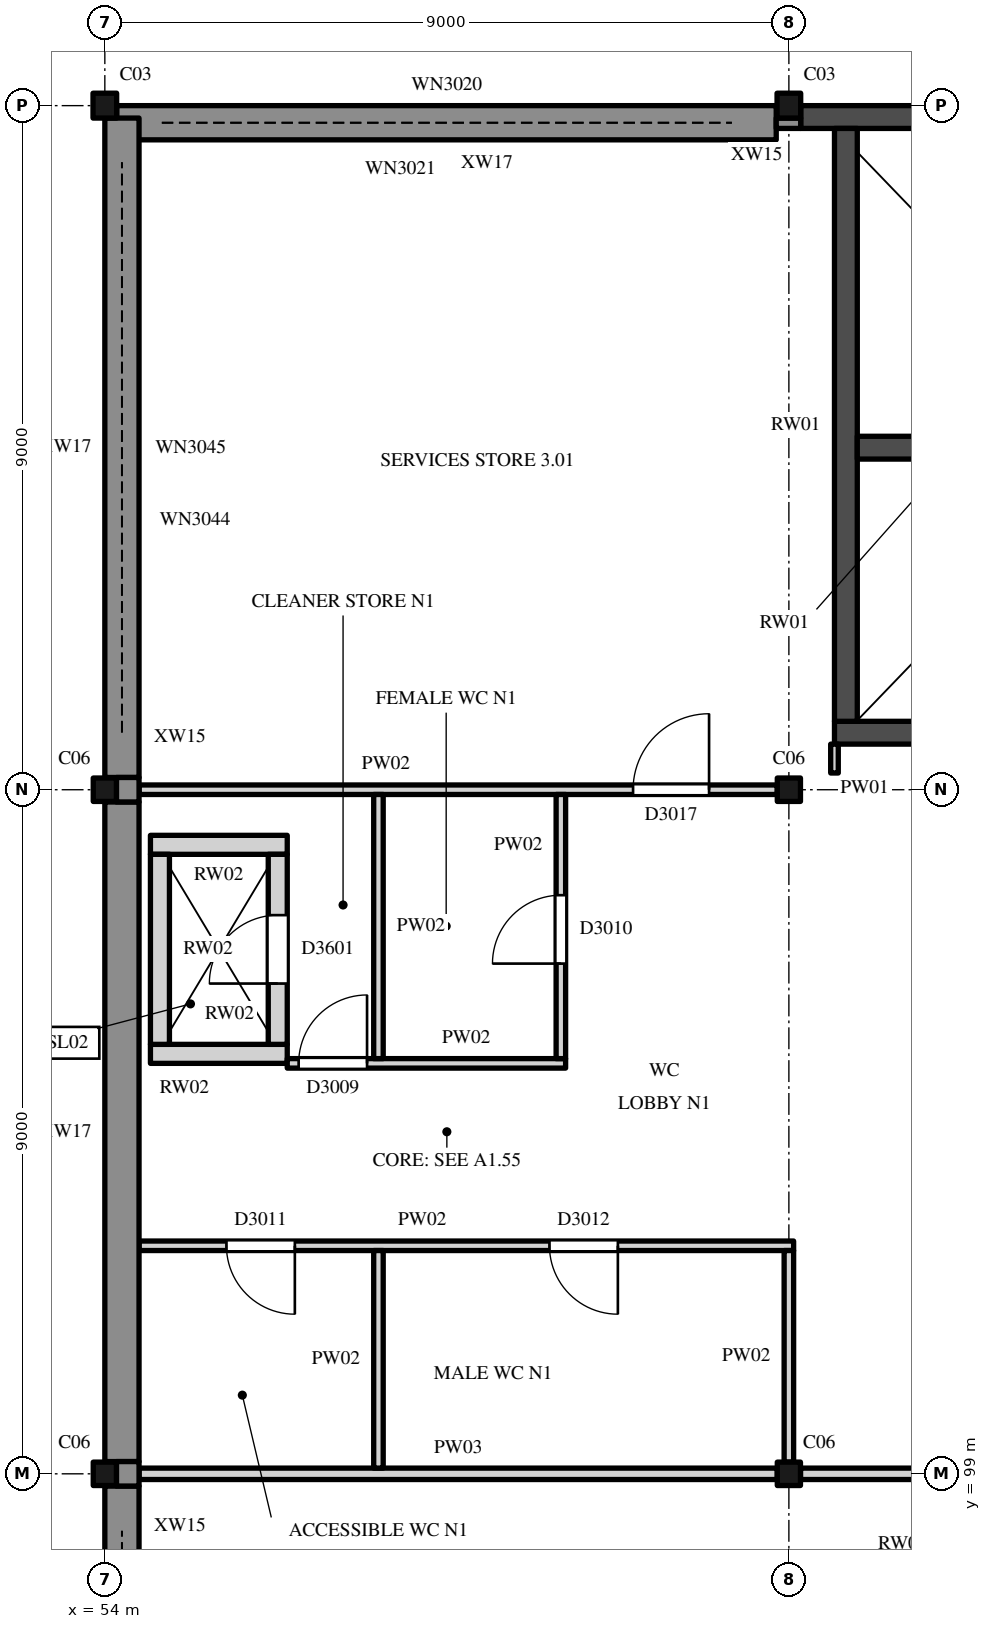
"""IFC4 building model, lengths in metres.
Left out: names, types, materials, properties, quantities, classifications, styles, units other than length and angle.
Written with IfcOpenShell. Run it as: python <this file> out.ifc"""

import sys

from ifc_helpers import new_model, si_unit, direction, frame, frame_2d, origin, origin_2d, place, context, subcontext, project, spatial, rectangle, i_section, extrude, element, fill, save


model = new_model("IFC4")
c1 = context("Model", 3, precision=1e-05, world=origin(), true_north=direction((0.0, 1.0)))
c2 = subcontext(c1, "Body", "Model", "MODEL_VIEW")
j1 = project(units=[si_unit("LENGTHUNIT", "METRE"), si_unit("PLANEANGLEUNIT", "RADIAN")], contexts=[c1])
p1 = place(None, origin())
s1 = spatial("IfcSite", under=j1, at=p1, CompositionType="ELEMENT")
p2 = place(p1, origin())
s2 = spatial("IfcBuilding", under=s1, at=p2, CompositionType="ELEMENT")
p3 = place(p2, frame((0.0, 0.0, 16.0)))
s3 = spatial("IfcBuildingStorey", under=s2, at=p3, CompositionType="ELEMENT", Elevation=16.0)
for number, where, z_axis, x_axis in (
    (1, (54.0, 99.0, 0.0), (0.0, 0.0, 1.0), (1.0, 0.0, 0.0)),
    (2, (63.0, 99.0, 0.0), (0.0, 0.0, 1.0), (1.0, 0.0, 0.0)),
    (3, (54.0, 108.0, 0.0), (0.0, 0.0, 1.0), (1.0, 0.0, 0.0)),
    (4, (63.0, 108.0, 0.0), (0.0, 0.0, 1.0), (1.0, 0.0, 0.0)),
):
    element("IfcColumn", number, at=place(p3, frame(where, z_axis=z_axis, x_axis=x_axis)), inside=s3, PredefinedType="COLUMN", context=c2, shape_type="SweptSolid", body=[
        extrude(i_section(OverallWidth=0.305, OverallDepth=0.308, WebThickness=0.01, FlangeThickness=0.015, FilletRadius=0.017, at=origin_2d()), origin(), (0.0, 0.0, 1.0), 10.0),
    ])
for number, where, z_axis, x_axis in (
    (5, (54.0, 117.0, 0.0), (0.0, 0.0, 1.0), (1.0, 0.0, 0.0)),
    (6, (63.0, 117.0, 0.0), (0.0, 0.0, 1.0), (1.0, 0.0, 0.0)),
):
    element("IfcColumn", number, at=place(p3, frame(where, z_axis=z_axis, x_axis=x_axis)), inside=s3, PredefinedType="COLUMN", context=c2, shape_type="SweptSolid", body=[
        extrude(i_section(OverallWidth=0.311, OverallDepth=0.327, WebThickness=0.016, FlangeThickness=0.025, FilletRadius=0.017, at=origin_2d()), origin(), (0.0, 0.0, 1.0), 10.0),
    ])
p4 = place(p3, frame((63.6, 108.75, 0.0), z_axis=(0.0, 0.0, 1.0), x_axis=(1.0, 0.0, 0.0)))
e7 = element("IfcWall", 7, at=p4, inside=s3, PredefinedType="SHEAR", context=c2, shape_type="SweptSolid", body=[
    extrude(rectangle(XDim=7.8, YDim=0.3, at=frame_2d((3.9, 0.0))), origin(), (0.0, 0.0, 1.0), 10.0),
])
p5 = place(p3, frame((63.156, 116.85, 0.0), z_axis=(0.0, 0.0, 1.0), x_axis=(1.0, 0.0, 0.0)))
e8 = element("IfcWall", 8, at=p5, inside=s3, PredefinedType="SHEAR", context=c2, shape_type="SweptSolid", body=[
    extrude(rectangle(XDim=8.689, YDim=0.3, at=frame_2d((4.344, 0.0))), origin(), (0.0, 0.0, 1.0), 10.0),
])
p6 = place(p3, frame((63.75, 108.9, 0.0), z_axis=(0.0, 0.0, 1.0), x_axis=(0.0, 1.0, 0.0)))
e9 = element("IfcWall", 9, at=p6, inside=s3, PredefinedType="SHEAR", context=c2, shape_type="SweptSolid", body=[
    extrude(rectangle(XDim=7.8, YDim=0.3, at=frame_2d((3.9, 0.0))), origin(), (0.0, 0.0, 1.0), 10.0),
])
p7 = place(p3, frame((66.6, 112.5, 0.0), z_axis=(0.0, 0.0, 1.0), x_axis=(-1.0, 0.0, 0.0)))
e10 = element("IfcWall", 10, at=p7, inside=s3, PredefinedType="SHEAR", context=c2, shape_type="SweptSolid", body=[
    extrude(rectangle(XDim=2.7, YDim=0.3, at=frame_2d((1.35, 0.0))), origin(), (0.0, 0.0, 1.0), 10.0),
])
for number, where, z_axis, x_axis in (
    (11, (54.6, 104.525, 0.0), (0.0, 0.0, 1.0), (1.0, 0.0, 0.0)),
    (12, (54.6, 107.275, 0.0), (0.0, 0.0, 1.0), (1.0, 0.0, 0.0)),
):
    element("IfcWall", number, at=place(p3, frame(where, z_axis=z_axis, x_axis=x_axis)), inside=s3, PredefinedType="STANDARD", context=c2, shape_type="SweptSolid", body=[
        extrude(rectangle(XDim=1.8, YDim=0.25, at=frame_2d((0.9, 0.0))), origin(), (0.0, 0.0, 1.0), 10.0),
    ])
p8 = place(p3, frame((54.725, 104.65, 0.0), z_axis=(0.0, 0.0, 1.0), x_axis=(0.0, 1.0, 0.0)))
e13 = element("IfcWall", 13, at=p8, inside=s3, PredefinedType="STANDARD", context=c2, shape_type="SweptSolid", body=[
    extrude(rectangle(XDim=2.5, YDim=0.25, at=frame_2d((1.25, 0.0))), origin(), (0.0, 0.0, 1.0), 10.0),
])
p9 = place(p3, frame((56.275, 104.65, 0.0), z_axis=(0.0, 0.0, 1.0), x_axis=(0.0, 1.0, 0.0)))
e14 = element("IfcWall", 14, at=p9, inside=s3, PredefinedType="STANDARD", context=c2, shape_type="SweptSolid", body=[
    extrude(rectangle(XDim=2.5, YDim=0.25, at=frame_2d((1.25, 0.0))), origin(), (0.0, 0.0, 1.0), 10.0),
])
p10 = place(p9, frame((0.8, 0.0, 0.0)))
e15 = element("IfcOpeningElement", 15, at=p10, cuts=e14, PredefinedType="OPENING", context=c2, shape_type="SweptSolid", body=[
    extrude(rectangle(XDim=0.9, YDim=2.1, at=frame_2d((0.45, 1.05))), frame((0.0, 0.135, 0.0), z_axis=(0.0, -1.0, 0.0), x_axis=(1.0, 0.0, 0.0)), (0.0, 0.0, 1.0), 0.27),
])
p11 = place(p3, frame((54.225, 90.164, 0.0), z_axis=(0.0, 0.0, 1.0), x_axis=(0.0, 1.0, 0.0)))
e16 = element("IfcWall", 16, at=p11, inside=s3, PredefinedType="SOLIDWALL", context=c2, shape_type="SweptSolid", body=[
    extrude(rectangle(XDim=8.676, YDim=0.45, at=frame_2d((4.338, 0.0))), origin(), (0.0, 0.0, 1.0), 9.371),
])
p12 = place(p11, frame((0.586, 0.0, 6.4)))
e17 = element("IfcOpeningElement", 17, at=p12, cuts=e16, PredefinedType="OPENING", context=c2, shape_type="SweptSolid", body=[
    extrude(rectangle(XDim=7.5, YDim=1.2, at=frame_2d((3.75, 0.6))), frame((0.0, 0.235, 0.0), z_axis=(0.0, -1.0, 0.0), x_axis=(1.0, 0.0, 0.0)), (0.0, 0.0, 1.0), 0.47),
])
p13 = place(p11, frame((0.586, 0.0, 1.6)))
e18 = element("IfcOpeningElement", 18, at=p13, cuts=e16, PredefinedType="OPENING", context=c2, shape_type="SweptSolid", body=[
    extrude(rectangle(XDim=7.5, YDim=1.2, at=frame_2d((3.75, 0.6))), frame((0.0, 0.235, 0.0), z_axis=(0.0, -1.0, 0.0), x_axis=(1.0, 0.0, 0.0)), (0.0, 0.0, 1.0), 0.47),
])
p14 = place(p3, frame((54.225, 99.161, 0.0), z_axis=(0.0, 0.0, 1.0), x_axis=(0.0, 1.0, 0.0)))
e19 = element("IfcWall", 19, at=p14, inside=s3, PredefinedType="SOLIDWALL", context=c2, shape_type="SweptSolid", body=[
    extrude(rectangle(XDim=8.678, YDim=0.45, at=frame_2d((4.339, 0.0))), origin(), (0.0, 0.0, 1.0), 9.371),
])
p15 = place(p3, frame((54.156, 116.775, 0.0), z_axis=(0.0, 0.0, 1.0), x_axis=(1.0, 0.0, 0.0)))
e20 = element("IfcWall", 20, at=p15, inside=s3, PredefinedType="SOLIDWALL", context=c2, shape_type="SweptSolid", body=[
    extrude(rectangle(XDim=8.678, YDim=0.45, at=frame_2d((4.339, 0.0))), origin(), (0.0, 0.0, 1.0), 9.473),
])
p16 = place(p15, frame((0.594, 0.0, 1.6)))
e21 = element("IfcOpeningElement", 21, at=p16, cuts=e20, PredefinedType="OPENING", context=c2, shape_type="SweptSolid", body=[
    extrude(rectangle(XDim=7.5, YDim=1.2, at=frame_2d((3.75, 0.6))), frame((0.0, 0.235, 0.0), z_axis=(0.0, -1.0, 0.0), x_axis=(1.0, 0.0, 0.0)), (0.0, 0.0, 1.0), 0.47),
])
p17 = place(p15, frame((0.594, 0.0, 6.4)))
e22 = element("IfcOpeningElement", 22, at=p17, cuts=e20, PredefinedType="OPENING", context=c2, shape_type="SweptSolid", body=[
    extrude(rectangle(XDim=7.5, YDim=1.2, at=frame_2d((3.75, 0.6))), frame((0.0, 0.235, 0.0), z_axis=(0.0, -1.0, 0.0), x_axis=(1.0, 0.0, 0.0)), (0.0, 0.0, 1.0), 0.47),
])
p18 = place(p3, frame((54.225, 108.161, 0.0), z_axis=(0.0, 0.0, 1.0), x_axis=(0.0, 1.0, 0.0)))
e23 = element("IfcWall", 23, at=p18, inside=s3, PredefinedType="SOLIDWALL", context=c2, shape_type="SweptSolid", body=[
    extrude(rectangle(XDim=8.676, YDim=0.45, at=frame_2d((4.338, 0.0))), origin(), (0.0, 0.0, 1.0), 9.371),
])
p19 = place(p18, frame((0.589, 0.0, 6.4)))
e24 = element("IfcOpeningElement", 24, at=p19, cuts=e23, PredefinedType="OPENING", context=c2, shape_type="SweptSolid", body=[
    extrude(rectangle(XDim=7.5, YDim=1.2, at=frame_2d((3.75, 0.6))), frame((0.0, 0.235, 0.0), z_axis=(0.0, -1.0, 0.0), x_axis=(1.0, 0.0, 0.0)), (0.0, 0.0, 1.0), 0.47),
])
p20 = place(p18, frame((0.596, 0.0, 1.6)))
e25 = element("IfcOpeningElement", 25, at=p20, cuts=e23, PredefinedType="OPENING", context=c2, shape_type="SweptSolid", body=[
    extrude(rectangle(XDim=7.5, YDim=1.2, at=frame_2d((3.75, 0.6))), frame((0.0, 0.235, 0.0), z_axis=(0.0, -1.0, 0.0), x_axis=(1.0, 0.0, 0.0)), (0.0, 0.0, 1.0), 0.47),
])
p21 = place(p3, frame((62.833, 116.768, 0.0), z_axis=(0.0, 0.0, 1.0), x_axis=(1.0, 0.0, 0.0)))
e26 = element("IfcWall", 26, at=p21, inside=s3, PredefinedType="SOLIDWALL", context=c2, shape_type="SweptSolid", body=[
    extrude(rectangle(XDim=0.322, YDim=0.136, at=frame_2d((0.161, 0.0))), origin(), (0.0, 0.0, 1.0), 10.0),
])
for number, where, z_axis, x_axis in (
    (27, (54.301, 98.839, 0.0), (0.0, 0.0, 1.0), (0.0, 1.0, 0.0)),
    (28, (54.301, 107.839, 0.0), (0.0, 0.0, 1.0), (0.0, 1.0, 0.0)),
):
    element("IfcWall", number, at=place(p3, frame(where, z_axis=z_axis, x_axis=x_axis)), inside=s3, PredefinedType="SOLIDWALL", context=c2, shape_type="SweptSolid", body=[
        extrude(rectangle(XDim=0.322, YDim=0.298, at=frame_2d((0.161, 0.0))), origin(), (0.0, 0.0, 1.0), 9.371),
    ])
p22 = place(p3, frame((54.45, 99.0, 0.0), z_axis=(0.0, 0.0, 1.0), x_axis=(1.0, 0.0, 0.0)))
e29 = element("IfcWall", 29, at=p22, inside=s3, PredefinedType="PARTITIONING", context=c2, shape_type="SweptSolid", body=[
    extrude(rectangle(XDim=8.397, YDim=0.15, at=frame_2d((4.199, 0.0))), origin(), (0.0, 0.0, 1.0), 9.473),
])
p23 = place(p3, frame((63.153, 99.0, 0.0), z_axis=(0.0, 0.0, 1.0), x_axis=(1.0, 0.0, 0.0)))
e30 = element("IfcWall", 30, at=p23, inside=s3, PredefinedType="PARTITIONING", context=c2, shape_type="SweptSolid", body=[
    extrude(rectangle(XDim=8.695, YDim=0.15, at=frame_2d((4.347, 0.0))), origin(), (0.0, 0.0, 1.0), 9.473),
])
p24 = place(p23, frame((3.85, 0.0, 0.0)))
e31 = element("IfcOpeningElement", 31, at=p24, cuts=e30, PredefinedType="OPENING", context=c2, shape_type="SweptSolid", body=[
    extrude(rectangle(XDim=1.0, YDim=2.4, at=frame_2d((0.5, 1.2))), frame((0.0, 0.085, 0.0), z_axis=(0.0, -1.0, 0.0), x_axis=(1.0, 0.0, 0.0)), (0.0, 0.0, 1.0), 0.17),
])
p25 = place(p3, frame((54.45, 102.0, 0.0), z_axis=(0.0, 0.0, 1.0), x_axis=(1.0, 0.0, 0.0)))
e32 = element("IfcWall", 32, at=p25, inside=s3, PredefinedType="PARTITIONING", context=c2, shape_type="SweptSolid", body=[
    extrude(rectangle(XDim=8.613, YDim=0.125, at=frame_2d((4.306, 0.0))), origin(), (0.0, 0.0, 1.0), 9.521),
])
p26 = place(p25, frame((1.15, 0.0, 0.0)))
e33 = element("IfcOpeningElement", 33, at=p26, cuts=e32, PredefinedType="OPENING", context=c2, shape_type="SweptSolid", body=[
    extrude(rectangle(XDim=0.9, YDim=2.1, at=frame_2d((0.45, 1.05))), frame((0.0, 0.073, 0.0), z_axis=(0.0, -1.0, 0.0), x_axis=(1.0, 0.0, 0.0)), (0.0, 0.0, 1.0), 0.145),
])
p27 = place(p25, frame((5.4, 0.0, 0.0)))
e34 = element("IfcOpeningElement", 34, at=p27, cuts=e32, PredefinedType="OPENING", context=c2, shape_type="SweptSolid", body=[
    extrude(rectangle(XDim=0.9, YDim=2.1, at=frame_2d((0.45, 1.05))), frame((0.0, 0.073, 0.0), z_axis=(0.0, -1.0, 0.0), x_axis=(1.0, 0.0, 0.0)), (0.0, 0.0, 1.0), 0.145),
])
p28 = place(p3, frame((56.4, 104.4, 0.0), z_axis=(0.0, 0.0, 1.0), x_axis=(1.0, 0.0, 0.0)))
e35 = element("IfcWall", 35, at=p28, inside=s3, PredefinedType="PARTITIONING", context=c2, shape_type="SweptSolid", body=[
    extrude(rectangle(XDim=3.663, YDim=0.125, at=frame_2d((1.831, 0.0))), origin(), (0.0, 0.0, 1.0), 9.825),
])
p29 = place(p28, frame((0.15, 0.0, 0.0)))
e36 = element("IfcOpeningElement", 36, at=p29, cuts=e35, PredefinedType="OPENING", context=c2, shape_type="SweptSolid", body=[
    extrude(rectangle(XDim=0.9, YDim=2.1, at=frame_2d((0.45, 1.05))), frame((0.0, 0.073, 0.0), z_axis=(0.0, -1.0, 0.0), x_axis=(1.0, 0.0, 0.0)), (0.0, 0.0, 1.0), 0.145),
])
p30 = place(p3, frame((54.45, 108.0, 0.0), z_axis=(0.0, 0.0, 1.0), x_axis=(1.0, 0.0, 0.0)))
e37 = element("IfcWall", 37, at=p30, inside=s3, PredefinedType="PARTITIONING", context=c2, shape_type="SweptSolid", body=[
    extrude(rectangle(XDim=8.397, YDim=0.125, at=frame_2d((4.199, 0.0))), origin(), (0.0, 0.0, 1.0), 9.473),
])
p31 = place(p30, frame((6.5, 0.0, 0.0)))
e38 = element("IfcOpeningElement", 38, at=p31, cuts=e37, PredefinedType="OPENING", context=c2, shape_type="SweptSolid", body=[
    extrude(rectangle(XDim=1.0, YDim=2.1, at=frame_2d((0.5, 1.05))), frame((0.0, 0.073, 0.0), z_axis=(0.0, -1.0, 0.0), x_axis=(1.0, 0.0, 0.0)), (0.0, 0.0, 1.0), 0.145),
])
p32 = place(p3, frame((57.6, 99.075, 0.0), z_axis=(0.0, 0.0, 1.0), x_axis=(0.0, 1.0, 0.0)))
e39 = element("IfcWall", 39, at=p32, inside=s3, PredefinedType="PARTITIONING", context=c2, shape_type="SweptSolid", body=[
    extrude(rectangle(XDim=2.863, YDim=0.125, at=frame_2d((1.431, 0.0))), origin(), (0.0, 0.0, 1.0), 9.825),
])
p33 = place(p3, frame((57.6, 104.462, 0.0), z_axis=(0.0, 0.0, 1.0), x_axis=(0.0, 1.0, 0.0)))
e40 = element("IfcWall", 40, at=p33, inside=s3, PredefinedType="PARTITIONING", context=c2, shape_type="SweptSolid", body=[
    extrude(rectangle(XDim=3.475, YDim=0.125, at=frame_2d((1.738, 0.0))), origin(), (0.0, 0.0, 1.0), 9.825),
])
p34 = place(p3, frame((60.0, 104.462, 0.0), z_axis=(0.0, 0.0, 1.0), x_axis=(0.0, 1.0, 0.0)))
e41 = element("IfcWall", 41, at=p34, inside=s3, PredefinedType="PARTITIONING", context=c2, shape_type="SweptSolid", body=[
    extrude(rectangle(XDim=3.475, YDim=0.125, at=frame_2d((1.738, 0.0))), origin(), (0.0, 0.0, 1.0), 9.825),
])
p35 = place(p34, frame((1.25, 0.0, 0.0)))
e42 = element("IfcOpeningElement", 42, at=p35, cuts=e41, PredefinedType="OPENING", context=c2, shape_type="SweptSolid", body=[
    extrude(rectangle(XDim=0.9, YDim=2.1, at=frame_2d((0.45, 1.05))), frame((0.0, 0.073, 0.0), z_axis=(0.0, -1.0, 0.0), x_axis=(1.0, 0.0, 0.0)), (0.0, 0.0, 1.0), 0.145),
])
p36 = place(p3, frame((63.0, 99.154, 0.0), z_axis=(0.0, 0.0, 1.0), x_axis=(0.0, 1.0, 0.0)))
e43 = element("IfcWall", 43, at=p36, inside=s3, PredefinedType="PARTITIONING", context=c2, shape_type="SweptSolid", body=[
    extrude(rectangle(XDim=2.783, YDim=0.125, at=frame_2d((1.392, 0.0))), origin(), (0.0, 0.0, 1.0), 9.371),
])
p37 = place(p3, frame((63.6, 108.22, 0.0), z_axis=(0.0, 0.0, 1.0), x_axis=(0.0, 1.0, 0.0)))
e44 = element("IfcWall", 44, at=p37, inside=s3, PredefinedType="PARTITIONING", context=c2, shape_type="SweptSolid", body=[
    extrude(rectangle(XDim=0.38, YDim=0.1, at=frame_2d((0.19, 0.0))), origin(), (0.0, 0.0, 1.0), 9.825),
])
p38 = place(p10, origin())
e45 = element("IfcDoor", 45, at=p38, inside=s3, OperationType="SINGLE_SWING_RIGHT", PredefinedType="DOOR", context=c2, shape_type="SweptSolid", body=[
    extrude(rectangle(XDim=0.9, YDim=2.1, at=frame_2d((0.45, 1.05))), frame((0.0, 0.025, 0.0), z_axis=(0.0, -1.0, 0.0), x_axis=(1.0, 0.0, 0.0)), (0.0, 0.0, 1.0), 0.05),
])
fill(e15, e45)
p39 = place(p16, origin())
e46 = element("IfcWindow", 46, at=p39, inside=s3, PartitioningType="SINGLE_PANEL", PredefinedType="WINDOW", context=c2, shape_type="SweptSolid", body=[
    extrude(rectangle(XDim=7.5, YDim=1.2, at=frame_2d((3.75, 0.6))), frame((0.0, 0.03, 0.0), z_axis=(0.0, -1.0, 0.0), x_axis=(1.0, 0.0, 0.0)), (0.0, 0.0, 1.0), 0.06),
])
fill(e21, e46)
p40 = place(p17, origin())
e47 = element("IfcWindow", 47, at=p40, inside=s3, PartitioningType="SINGLE_PANEL", PredefinedType="WINDOW", context=c2, shape_type="SweptSolid", body=[
    extrude(rectangle(XDim=7.5, YDim=1.2, at=frame_2d((3.75, 0.6))), frame((0.0, 0.03, 0.0), z_axis=(0.0, -1.0, 0.0), x_axis=(1.0, 0.0, 0.0)), (0.0, 0.0, 1.0), 0.06),
])
fill(e22, e47)
p41 = place(p12, origin())
e48 = element("IfcWindow", 48, at=p41, inside=s3, PartitioningType="SINGLE_PANEL", PredefinedType="WINDOW", context=c2, shape_type="SweptSolid", body=[
    extrude(rectangle(XDim=7.5, YDim=1.2, at=frame_2d((3.75, 0.6))), frame((0.0, 0.03, 0.0), z_axis=(0.0, -1.0, 0.0), x_axis=(1.0, 0.0, 0.0)), (0.0, 0.0, 1.0), 0.06),
])
fill(e17, e48)
p42 = place(p19, origin())
e49 = element("IfcWindow", 49, at=p42, inside=s3, PartitioningType="SINGLE_PANEL", PredefinedType="WINDOW", context=c2, shape_type="SweptSolid", body=[
    extrude(rectangle(XDim=7.5, YDim=1.2, at=frame_2d((3.75, 0.6))), frame((0.0, 0.03, 0.0), z_axis=(0.0, -1.0, 0.0), x_axis=(1.0, 0.0, 0.0)), (0.0, 0.0, 1.0), 0.06),
])
fill(e24, e49)
p43 = place(p13, origin())
e50 = element("IfcWindow", 50, at=p43, inside=s3, PartitioningType="SINGLE_PANEL", PredefinedType="WINDOW", context=c2, shape_type="SweptSolid", body=[
    extrude(rectangle(XDim=7.5, YDim=1.2, at=frame_2d((3.75, 0.6))), frame((0.0, 0.03, 0.0), z_axis=(0.0, -1.0, 0.0), x_axis=(1.0, 0.0, 0.0)), (0.0, 0.0, 1.0), 0.06),
])
fill(e18, e50)
p44 = place(p20, origin())
e51 = element("IfcWindow", 51, at=p44, inside=s3, PartitioningType="SINGLE_PANEL", PredefinedType="WINDOW", context=c2, shape_type="SweptSolid", body=[
    extrude(rectangle(XDim=7.5, YDim=1.2, at=frame_2d((3.75, 0.6))), frame((0.0, 0.03, 0.0), z_axis=(0.0, -1.0, 0.0), x_axis=(1.0, 0.0, 0.0)), (0.0, 0.0, 1.0), 0.06),
])
fill(e25, e51)
p45 = place(p29, origin())
e52 = element("IfcDoor", 52, at=p45, inside=s3, OperationType="SINGLE_SWING_LEFT", PredefinedType="DOOR", context=c2, shape_type="SweptSolid", body=[
    extrude(rectangle(XDim=0.9, YDim=2.1, at=frame_2d((0.45, 1.05))), frame((0.0, 0.025, 0.0), z_axis=(0.0, -1.0, 0.0), x_axis=(1.0, 0.0, 0.0)), (0.0, 0.0, 1.0), 0.05),
])
fill(e36, e52)
p46 = place(p35, origin())
e53 = element("IfcDoor", 53, at=p46, inside=s3, OperationType="SINGLE_SWING_RIGHT", PredefinedType="DOOR", context=c2, shape_type="SweptSolid", body=[
    extrude(rectangle(XDim=0.9, YDim=2.1, at=frame_2d((0.45, 1.05))), frame((0.0, 0.025, 0.0), z_axis=(0.0, -1.0, 0.0), x_axis=(1.0, 0.0, 0.0)), (0.0, 0.0, 1.0), 0.05),
])
fill(e42, e53)
p47 = place(p26, origin())
e54 = element("IfcDoor", 54, at=p47, inside=s3, OperationType="SINGLE_SWING_RIGHT", PredefinedType="DOOR", context=c2, shape_type="SweptSolid", body=[
    extrude(rectangle(XDim=0.9, YDim=2.1, at=frame_2d((0.45, 1.05))), frame((0.0, 0.025, 0.0), z_axis=(0.0, -1.0, 0.0), x_axis=(1.0, 0.0, 0.0)), (0.0, 0.0, 1.0), 0.05),
])
fill(e33, e54)
p48 = place(p27, origin())
e55 = element("IfcDoor", 55, at=p48, inside=s3, OperationType="SINGLE_SWING_RIGHT", PredefinedType="DOOR", context=c2, shape_type="SweptSolid", body=[
    extrude(rectangle(XDim=0.9, YDim=2.1, at=frame_2d((0.45, 1.05))), frame((0.0, 0.025, 0.0), z_axis=(0.0, -1.0, 0.0), x_axis=(1.0, 0.0, 0.0)), (0.0, 0.0, 1.0), 0.05),
])
fill(e34, e55)
p49 = place(p31, origin())
e56 = element("IfcDoor", 56, at=p49, inside=s3, OperationType="SINGLE_SWING_LEFT", PredefinedType="DOOR", context=c2, shape_type="SweptSolid", body=[
    extrude(rectangle(XDim=1.0, YDim=2.1, at=frame_2d((0.5, 1.05))), frame((0.0, 0.025, 0.0), z_axis=(0.0, -1.0, 0.0), x_axis=(1.0, 0.0, 0.0)), (0.0, 0.0, 1.0), 0.05),
])
fill(e38, e56)
save(model, sys.argv[1])
